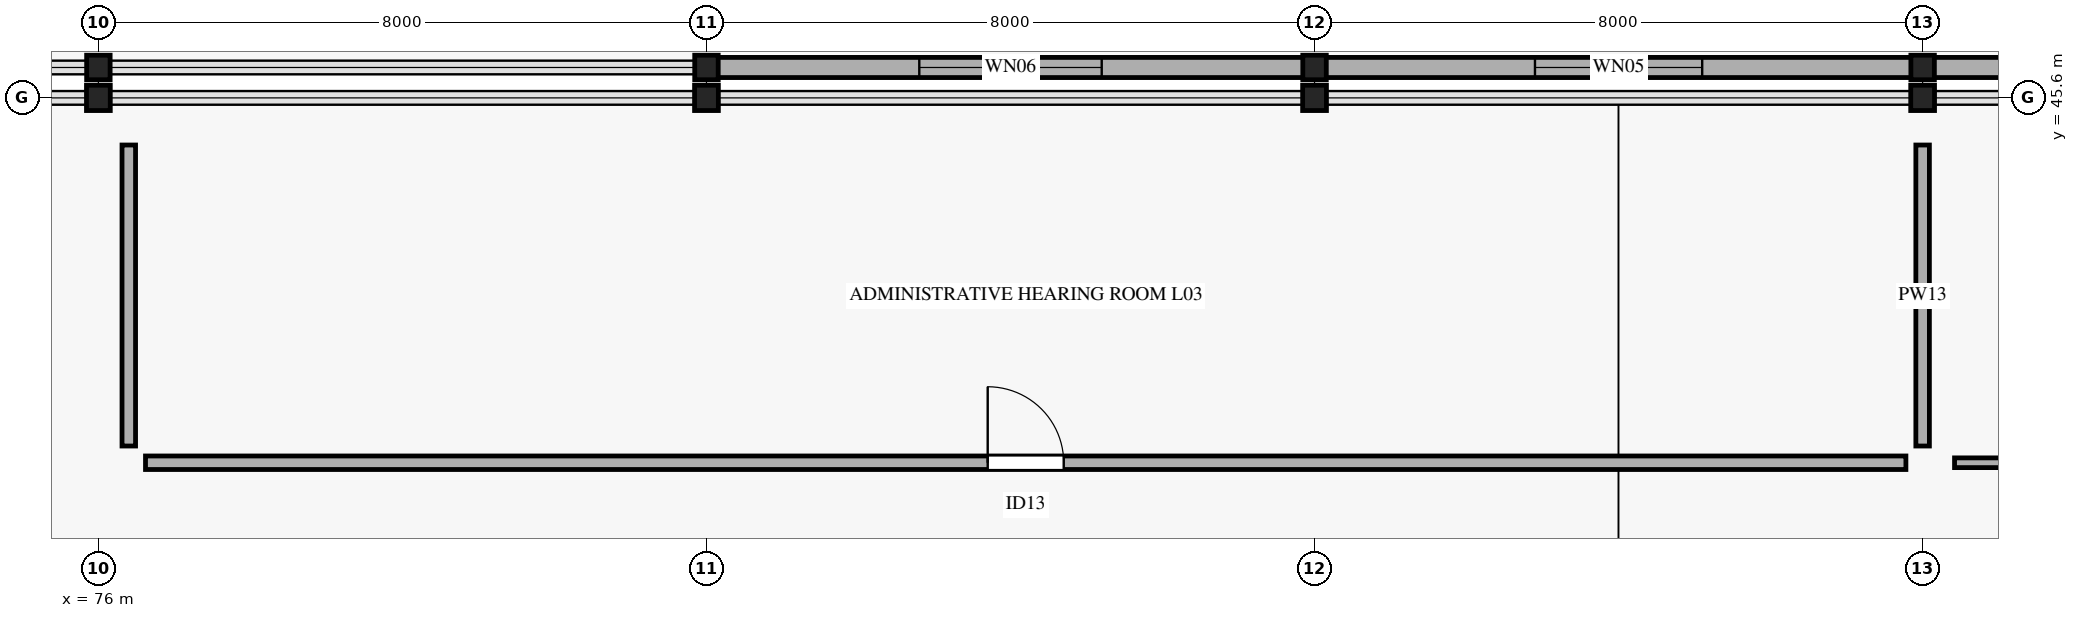
"""IFC4 building model, lengths in metres.
Left out: names, types, materials, properties, quantities, classifications, styles, units other than length and angle.
Written with IfcOpenShell. Run it as: python <this file> out.ifc"""

import sys

from ifc_helpers import new_model, si_unit, direction, frame, frame_2d, origin, origin_2d, place, context, subcontext, project, spatial, rectangle, i_section, extrude, element, fill, save


model = new_model("IFC4")
c1 = context("Model", 3, precision=1e-05, world=origin(), true_north=direction((0.0, 1.0)))
c2 = subcontext(c1, "Body", "Model", "MODEL_VIEW")
j1 = project(units=[si_unit("LENGTHUNIT", "METRE"), si_unit("PLANEANGLEUNIT", "RADIAN")], contexts=[c1])
p1 = place(None, origin())
s1 = spatial("IfcSite", under=j1, at=p1, CompositionType="ELEMENT")
p2 = place(p1, origin())
s2 = spatial("IfcBuilding", under=s1, at=p2, CompositionType="ELEMENT")
p3 = place(p2, frame((0.0, 0.0, 15.6)))
s3 = spatial("IfcBuildingStorey", under=s2, at=p3, CompositionType="ELEMENT", Elevation=15.6)
for number, where, z_axis, x_axis in (
    (1, (76.0, 45.6, 0.0), (0.0, 0.0, 1.0), (1.0, 0.0, 0.0)),
    (2, (84.0, 45.6, 0.0), (0.0, 0.0, 1.0), (1.0, 0.0, 0.0)),
    (3, (92.0, 45.6, 0.0), (0.0, 0.0, 1.0), (1.0, 0.0, 0.0)),
    (4, (100.0, 45.6, 0.0), (0.0, 0.0, 1.0), (1.0, 0.0, 0.0)),
):
    element("IfcColumn", number, at=place(p3, frame(where, z_axis=z_axis, x_axis=x_axis)), inside=s3, PredefinedType="COLUMN", context=c2, shape_type="SweptSolid", body=[
        extrude(i_section(OverallWidth=0.313, OverallDepth=0.333, WebThickness=0.018, FlangeThickness=0.028, FilletRadius=0.015, at=origin_2d()), origin(), (0.0, 0.0, 1.0), 4.59),
    ])
for number, where, z_axis, x_axis in (
    (5, (76.0, 46.0, 0.0), (0.0, 0.0, 1.0), (1.0, 0.0, 0.0)),
    (6, (84.0, 46.0, 0.0), (0.0, 0.0, 1.0), (1.0, 0.0, 0.0)),
    (7, (92.0, 46.0, 0.0), (0.0, 0.0, 1.0), (1.0, 0.0, 0.0)),
    (8, (100.0, 46.0, 0.0), (0.0, 0.0, 1.0), (1.0, 0.0, 0.0)),
):
    element("IfcColumn", number, at=place(p3, frame(where, z_axis=z_axis, x_axis=x_axis)), inside=s3, PredefinedType="COLUMN", context=c2, shape_type="SweptSolid", body=[
        extrude(i_section(OverallWidth=0.309, OverallDepth=0.323, WebThickness=0.014, FlangeThickness=0.023, FilletRadius=0.015, at=origin_2d()), origin(), (0.0, 0.0, 1.0), 4.59),
    ])
p4 = place(p3, frame((108.02, 46.0, 0.0), z_axis=(0.0, 0.0, 1.0), x_axis=(-1.0, 0.0, 0.0)))
e9 = element("IfcWall", 9, at=p4, inside=s3, PredefinedType="STANDARD", context=c2, shape_type="SweptSolid", body=[
    extrude(rectangle(XDim=8.04, YDim=0.265, at=frame_2d((4.02, 0.0))), origin(), (0.0, 0.0, 1.0), 3.66),
])
p5 = place(p4, frame((3.02, 0.0, 0.75)))
e10 = element("IfcOpeningElement", 10, at=p5, cuts=e9, PredefinedType="OPENING", context=c2, shape_type="SweptSolid", body=[
    extrude(rectangle(XDim=2.0, YDim=2.0, at=frame_2d((1.0, 1.0))), frame((0.0, 0.142, 0.0), z_axis=(0.0, -1.0, 0.0), x_axis=(1.0, 0.0, 0.0)), (0.0, 0.0, 1.0), 0.285),
])
p6 = place(p3, frame((100.02, 46.0, 0.0), z_axis=(0.0, 0.0, 1.0), x_axis=(-1.0, 0.0, 0.0)))
e11 = element("IfcWall", 11, at=p6, inside=s3, PredefinedType="STANDARD", context=c2, shape_type="SweptSolid", body=[
    extrude(rectangle(XDim=8.04, YDim=0.265, at=frame_2d((4.02, 0.0))), origin(), (0.0, 0.0, 1.0), 3.66),
])
p7 = place(p6, frame((2.92, 0.0, 0.75)))
e12 = element("IfcOpeningElement", 12, at=p7, cuts=e11, PredefinedType="OPENING", context=c2, shape_type="SweptSolid", body=[
    extrude(rectangle(XDim=2.2, YDim=2.0, at=frame_2d((1.1, 1.0))), frame((0.0, 0.142, 0.0), z_axis=(0.0, -1.0, 0.0), x_axis=(1.0, 0.0, 0.0)), (0.0, 0.0, 1.0), 0.285),
])
p8 = place(p3, frame((92.02, 46.0, 0.0), z_axis=(0.0, 0.0, 1.0), x_axis=(-1.0, 0.0, 0.0)))
e13 = element("IfcWall", 13, at=p8, inside=s3, PredefinedType="STANDARD", context=c2, shape_type="SweptSolid", body=[
    extrude(rectangle(XDim=8.04, YDim=0.265, at=frame_2d((4.02, 0.0))), origin(), (0.0, 0.0, 1.0), 3.66),
])
p9 = place(p8, frame((2.82, 0.0, 0.75)))
e14 = element("IfcOpeningElement", 14, at=p9, cuts=e13, PredefinedType="OPENING", context=c2, shape_type="SweptSolid", body=[
    extrude(rectangle(XDim=2.4, YDim=2.0, at=frame_2d((1.2, 1.0))), frame((0.0, 0.142, 0.0), z_axis=(0.0, -1.0, 0.0), x_axis=(1.0, 0.0, 0.0)), (0.0, 0.0, 1.0), 0.285),
])
p10 = place(p3, frame((76.62, 40.8, 0.0), z_axis=(0.0, 0.0, 1.0), x_axis=(1.0, 0.0, 0.0)))
e15 = element("IfcWall", 15, at=p10, inside=s3, PredefinedType="PARTITIONING", context=c2, shape_type="SweptSolid", body=[
    extrude(rectangle(XDim=23.16, YDim=0.178, at=frame_2d((11.58, 0.0))), origin(), (0.0, 0.0, 1.0), 3.45),
])
p11 = place(p10, frame((11.08, 0.0, 0.0)))
e16 = element("IfcOpeningElement", 16, at=p11, cuts=e15, PredefinedType="OPENING", context=c2, shape_type="SweptSolid", body=[
    extrude(rectangle(XDim=1.0, YDim=2.3, at=frame_2d((0.5, 1.15))), frame((0.0, 0.099, 0.0), z_axis=(0.0, -1.0, 0.0), x_axis=(1.0, 0.0, 0.0)), (0.0, 0.0, 1.0), 0.198),
])
for number, where, z_axis, x_axis in (
    (17, (100.0, 41.02, 0.0), (0.0, 0.0, 1.0), (0.0, 1.0, 0.0)),
    (18, (76.4, 41.02, 0.0), (0.0, 0.0, 1.0), (0.0, 1.0, 0.0)),
):
    element("IfcWall", number, at=place(p3, frame(where, z_axis=z_axis, x_axis=x_axis)), inside=s3, PredefinedType="PARTITIONING", context=c2, shape_type="SweptSolid", body=[
        extrude(rectangle(XDim=3.96, YDim=0.178, at=frame_2d((1.98, 0.0))), origin(), (0.0, 0.0, 1.0), 3.45),
    ])
p12 = place(p3, frame((100.42, 40.8, 0.0), z_axis=(0.0, 0.0, 1.0), x_axis=(1.0, 0.0, 0.0)))
e19 = element("IfcWall", 19, at=p12, inside=s3, PredefinedType="PARTITIONING", context=c2, shape_type="SweptSolid", body=[
    extrude(rectangle(XDim=14.96, YDim=0.128, at=frame_2d((7.48, 0.0))), origin(), (0.0, 0.0, 1.0), 3.45),
])
p13 = place(p12, frame((7.0, 0.0, 0.0)))
e20 = element("IfcOpeningElement", 20, at=p13, cuts=e19, PredefinedType="OPENING", context=c2, shape_type="SweptSolid", body=[
    extrude(rectangle(XDim=0.96, YDim=2.25, at=frame_2d((0.48, 1.125))), frame((0.0, 0.074, 0.0), z_axis=(0.0, -1.0, 0.0), x_axis=(1.0, 0.0, 0.0)), (0.0, 0.0, 1.0), 0.148),
])
p14 = place(p7, origin())
e21 = element("IfcWindow", 21, at=p14, inside=s3, PartitioningType="SINGLE_PANEL", PredefinedType="WINDOW", context=c2, shape_type="SweptSolid", body=[
    extrude(rectangle(XDim=2.2, YDim=2.0, at=frame_2d((1.1, 1.0))), frame((0.0, 0.03, 0.0), z_axis=(0.0, -1.0, 0.0), x_axis=(1.0, 0.0, 0.0)), (0.0, 0.0, 1.0), 0.06),
])
fill(e12, e21)
p15 = place(p9, origin())
e22 = element("IfcWindow", 22, at=p15, inside=s3, PartitioningType="SINGLE_PANEL", PredefinedType="WINDOW", context=c2, shape_type="SweptSolid", body=[
    extrude(rectangle(XDim=2.4, YDim=2.0, at=frame_2d((1.2, 1.0))), frame((0.0, 0.03, 0.0), z_axis=(0.0, -1.0, 0.0), x_axis=(1.0, 0.0, 0.0)), (0.0, 0.0, 1.0), 0.06),
])
fill(e14, e22)
p16 = place(p11, origin())
e23 = element("IfcDoor", 23, at=p16, inside=s3, OperationType="SINGLE_SWING_LEFT", PredefinedType="DOOR", context=c2, shape_type="SweptSolid", body=[
    extrude(rectangle(XDim=1.0, YDim=2.3, at=frame_2d((0.5, 1.15))), frame((0.0, 0.025, 0.0), z_axis=(0.0, -1.0, 0.0), x_axis=(1.0, 0.0, 0.0)), (0.0, 0.0, 1.0), 0.05),
])
fill(e16, e23)
save(model, sys.argv[1])
